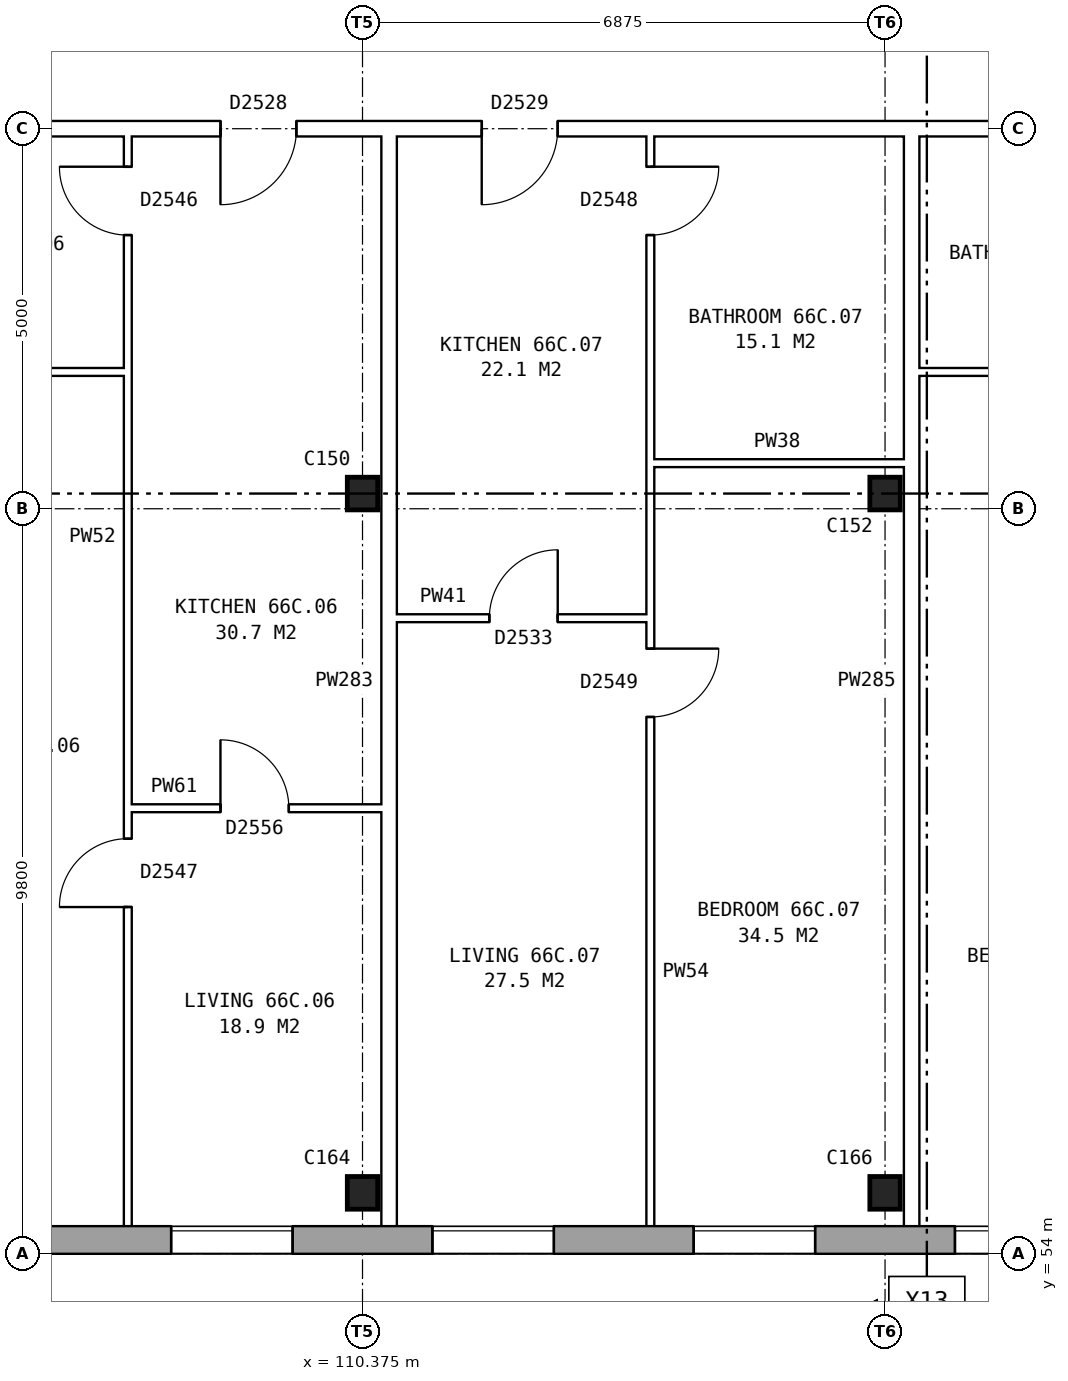
"""IFC4 building model, lengths in metres.
Left out: names, types, materials, properties, quantities, classifications, styles, units other than length and angle.
Written with IfcOpenShell. Run it as: python <this file> out.ifc"""

import sys

from ifc_helpers import new_model, si_unit, direction, frame, frame_2d, origin, origin_2d, place, context, subcontext, project, spatial, rectangle, i_section, extrude, element, fill, save


model = new_model("IFC4")
c1 = context("Model", 3, precision=1e-05, world=origin(), true_north=direction((0.0, 1.0)))
c2 = subcontext(c1, "Body", "Model", "MODEL_VIEW")
j1 = project(units=[si_unit("LENGTHUNIT", "METRE"), si_unit("PLANEANGLEUNIT", "RADIAN")], contexts=[c1])
p1 = place(None, origin())
s1 = spatial("IfcSite", under=j1, at=p1, CompositionType="ELEMENT")
p2 = place(p1, origin())
s2 = spatial("IfcBuilding", under=s1, at=p2, CompositionType="ELEMENT")
p3 = place(p2, frame((0.0, 0.0, 233.8)))
s3 = spatial("IfcBuildingStorey", under=s2, at=p3, CompositionType="ELEMENT", Elevation=233.8)
for number, where, z_axis, x_axis in (
    (1, (110.375, 54.8, 0.0), (0.0, 0.0, 1.0), (1.0, 0.0, 0.0)),
    (2, (117.25, 54.8, 0.0), (0.0, 0.0, 1.0), (1.0, 0.0, 0.0)),
    (3, (110.375, 64.0, 0.0), (0.0, 0.0, 1.0), (1.0, 0.0, 0.0)),
    (4, (117.25, 64.0, 0.0), (0.0, 0.0, 1.0), (1.0, 0.0, 0.0)),
):
    element("IfcColumn", number, at=place(p3, frame(where, z_axis=z_axis, x_axis=x_axis)), inside=s3, PredefinedType="COLUMN", context=c2, shape_type="SweptSolid", body=[
        extrude(i_section(OverallWidth=0.4, OverallDepth=0.43, WebThickness=0.028, FlangeThickness=0.04, at=origin_2d()), origin(), (0.0, 0.0, 1.0), 2.85),
    ])
p4 = place(p3, frame((75.95, 54.18, 0.0), z_axis=(0.0, 0.0, 1.0), x_axis=(1.0, 0.0, 0.0)))
e5 = element("IfcWall", 5, at=p4, inside=s3, PredefinedType="STANDARD", context=c2, shape_type="SweptSolid", body=[
    extrude(rectangle(XDim=55.1, YDim=0.36, at=frame_2d((27.55, 0.0))), origin(), (0.0, 0.0, 1.0), 2.85),
])
p5 = place(p4, frame((0.969, 0.0, 0.8)))
e6 = element("IfcOpeningElement", 6, at=p5, cuts=e5, PredefinedType="OPENING", context=c2, shape_type="SweptSolid", body=[
    extrude(rectangle(XDim=1.6, YDim=1.8, at=frame_2d((0.8, 0.9))), frame((0.0, 0.19, 0.0), z_axis=(0.0, -1.0, 0.0), x_axis=(1.0, 0.0, 0.0)), (0.0, 0.0, 1.0), 0.38),
])
p6 = place(p4, frame((4.406, 0.0, 0.8)))
e7 = element("IfcOpeningElement", 7, at=p6, cuts=e5, PredefinedType="OPENING", context=c2, shape_type="SweptSolid", body=[
    extrude(rectangle(XDim=1.6, YDim=1.8, at=frame_2d((0.8, 0.9))), frame((0.0, 0.19, 0.0), z_axis=(0.0, -1.0, 0.0), x_axis=(1.0, 0.0, 0.0)), (0.0, 0.0, 1.0), 0.38),
])
p7 = place(p4, frame((7.844, 0.0, 0.8)))
e8 = element("IfcOpeningElement", 8, at=p7, cuts=e5, PredefinedType="OPENING", context=c2, shape_type="SweptSolid", body=[
    extrude(rectangle(XDim=1.6, YDim=1.8, at=frame_2d((0.8, 0.9))), frame((0.0, 0.19, 0.0), z_axis=(0.0, -1.0, 0.0), x_axis=(1.0, 0.0, 0.0)), (0.0, 0.0, 1.0), 0.38),
])
p8 = place(p4, frame((11.281, 0.0, 0.8)))
e9 = element("IfcOpeningElement", 9, at=p8, cuts=e5, PredefinedType="OPENING", context=c2, shape_type="SweptSolid", body=[
    extrude(rectangle(XDim=1.6, YDim=1.8, at=frame_2d((0.8, 0.9))), frame((0.0, 0.19, 0.0), z_axis=(0.0, -1.0, 0.0), x_axis=(1.0, 0.0, 0.0)), (0.0, 0.0, 1.0), 0.38),
])
p9 = place(p4, frame((14.719, 0.0, 0.8)))
e10 = element("IfcOpeningElement", 10, at=p9, cuts=e5, PredefinedType="OPENING", context=c2, shape_type="SweptSolid", body=[
    extrude(rectangle(XDim=1.6, YDim=1.8, at=frame_2d((0.8, 0.9))), frame((0.0, 0.19, 0.0), z_axis=(0.0, -1.0, 0.0), x_axis=(1.0, 0.0, 0.0)), (0.0, 0.0, 1.0), 0.38),
])
p10 = place(p4, frame((18.156, 0.0, 0.8)))
e11 = element("IfcOpeningElement", 11, at=p10, cuts=e5, PredefinedType="OPENING", context=c2, shape_type="SweptSolid", body=[
    extrude(rectangle(XDim=1.6, YDim=1.8, at=frame_2d((0.8, 0.9))), frame((0.0, 0.19, 0.0), z_axis=(0.0, -1.0, 0.0), x_axis=(1.0, 0.0, 0.0)), (0.0, 0.0, 1.0), 0.38),
])
p11 = place(p4, frame((21.594, 0.0, 0.8)))
e12 = element("IfcOpeningElement", 12, at=p11, cuts=e5, PredefinedType="OPENING", context=c2, shape_type="SweptSolid", body=[
    extrude(rectangle(XDim=1.6, YDim=1.8, at=frame_2d((0.8, 0.9))), frame((0.0, 0.19, 0.0), z_axis=(0.0, -1.0, 0.0), x_axis=(1.0, 0.0, 0.0)), (0.0, 0.0, 1.0), 0.38),
])
p12 = place(p4, frame((25.031, 0.0, 0.8)))
e13 = element("IfcOpeningElement", 13, at=p12, cuts=e5, PredefinedType="OPENING", context=c2, shape_type="SweptSolid", body=[
    extrude(rectangle(XDim=1.6, YDim=1.8, at=frame_2d((0.8, 0.9))), frame((0.0, 0.19, 0.0), z_axis=(0.0, -1.0, 0.0), x_axis=(1.0, 0.0, 0.0)), (0.0, 0.0, 1.0), 0.38),
])
p13 = place(p4, frame((28.469, 0.0, 0.8)))
e14 = element("IfcOpeningElement", 14, at=p13, cuts=e5, PredefinedType="OPENING", context=c2, shape_type="SweptSolid", body=[
    extrude(rectangle(XDim=1.6, YDim=1.8, at=frame_2d((0.8, 0.9))), frame((0.0, 0.19, 0.0), z_axis=(0.0, -1.0, 0.0), x_axis=(1.0, 0.0, 0.0)), (0.0, 0.0, 1.0), 0.38),
])
p14 = place(p4, frame((31.906, 0.0, 0.8)))
e15 = element("IfcOpeningElement", 15, at=p14, cuts=e5, PredefinedType="OPENING", context=c2, shape_type="SweptSolid", body=[
    extrude(rectangle(XDim=1.6, YDim=1.8, at=frame_2d((0.8, 0.9))), frame((0.0, 0.19, 0.0), z_axis=(0.0, -1.0, 0.0), x_axis=(1.0, 0.0, 0.0)), (0.0, 0.0, 1.0), 0.38),
])
p15 = place(p4, frame((35.344, 0.0, 0.8)))
e16 = element("IfcOpeningElement", 16, at=p15, cuts=e5, PredefinedType="OPENING", context=c2, shape_type="SweptSolid", body=[
    extrude(rectangle(XDim=1.6, YDim=1.8, at=frame_2d((0.8, 0.9))), frame((0.0, 0.19, 0.0), z_axis=(0.0, -1.0, 0.0), x_axis=(1.0, 0.0, 0.0)), (0.0, 0.0, 1.0), 0.38),
])
p16 = place(p4, frame((38.781, 0.0, 0.8)))
e17 = element("IfcOpeningElement", 17, at=p16, cuts=e5, PredefinedType="OPENING", context=c2, shape_type="SweptSolid", body=[
    extrude(rectangle(XDim=1.6, YDim=1.8, at=frame_2d((0.8, 0.9))), frame((0.0, 0.19, 0.0), z_axis=(0.0, -1.0, 0.0), x_axis=(1.0, 0.0, 0.0)), (0.0, 0.0, 1.0), 0.38),
])
p17 = place(p4, frame((42.219, 0.0, 0.8)))
e18 = element("IfcOpeningElement", 18, at=p17, cuts=e5, PredefinedType="OPENING", context=c2, shape_type="SweptSolid", body=[
    extrude(rectangle(XDim=1.6, YDim=1.8, at=frame_2d((0.8, 0.9))), frame((0.0, 0.19, 0.0), z_axis=(0.0, -1.0, 0.0), x_axis=(1.0, 0.0, 0.0)), (0.0, 0.0, 1.0), 0.38),
])
p18 = place(p4, frame((45.656, 0.0, 0.8)))
e19 = element("IfcOpeningElement", 19, at=p18, cuts=e5, PredefinedType="OPENING", context=c2, shape_type="SweptSolid", body=[
    extrude(rectangle(XDim=1.6, YDim=1.8, at=frame_2d((0.8, 0.9))), frame((0.0, 0.19, 0.0), z_axis=(0.0, -1.0, 0.0), x_axis=(1.0, 0.0, 0.0)), (0.0, 0.0, 1.0), 0.38),
])
p19 = place(p4, frame((49.094, 0.0, 0.8)))
e20 = element("IfcOpeningElement", 20, at=p19, cuts=e5, PredefinedType="OPENING", context=c2, shape_type="SweptSolid", body=[
    extrude(rectangle(XDim=1.6, YDim=1.8, at=frame_2d((0.8, 0.9))), frame((0.0, 0.19, 0.0), z_axis=(0.0, -1.0, 0.0), x_axis=(1.0, 0.0, 0.0)), (0.0, 0.0, 1.0), 0.38),
])
p20 = place(p4, frame((52.531, 0.0, 0.8)))
e21 = element("IfcOpeningElement", 21, at=p20, cuts=e5, PredefinedType="OPENING", context=c2, shape_type="SweptSolid", body=[
    extrude(rectangle(XDim=1.6, YDim=1.8, at=frame_2d((0.8, 0.9))), frame((0.0, 0.19, 0.0), z_axis=(0.0, -1.0, 0.0), x_axis=(1.0, 0.0, 0.0)), (0.0, 0.0, 1.0), 0.38),
])
p21 = place(p3, frame((107.287, 59.86, 0.0), z_axis=(0.0, 0.0, 1.0), x_axis=(1.0, 0.0, 0.0)))
e22 = element("IfcWall", 22, at=p21, inside=s3, PredefinedType="PARTITIONING", context=c2, shape_type="SweptSolid", body=[
    extrude(rectangle(XDim=3.338, YDim=0.1, at=frame_2d((1.669, 0.0))), origin(), (0.0, 0.0, 1.0), 2.85),
])
p22 = place(p21, frame((1.219, 0.0, 0.0)))
e23 = element("IfcOpeningElement", 23, at=p22, cuts=e22, PredefinedType="OPENING", context=c2, shape_type="SweptSolid", body=[
    extrude(rectangle(XDim=0.9, YDim=2.1, at=frame_2d((0.45, 1.05))), frame((0.0, 0.06, 0.0), z_axis=(0.0, -1.0, 0.0), x_axis=(1.0, 0.0, 0.0)), (0.0, 0.0, 1.0), 0.12),
])
p23 = place(p3, frame((110.825, 62.36, 0.0), z_axis=(0.0, 0.0, 1.0), x_axis=(1.0, 0.0, 0.0)))
e24 = element("IfcWall", 24, at=p23, inside=s3, PredefinedType="PARTITIONING", context=c2, shape_type="SweptSolid", body=[
    extrude(rectangle(XDim=3.337, YDim=0.1, at=frame_2d((1.668, 0.0))), origin(), (0.0, 0.0, 1.0), 2.85),
])
p24 = place(p23, frame((1.219, 0.0, 0.0)))
e25 = element("IfcOpeningElement", 25, at=p24, cuts=e24, PredefinedType="OPENING", context=c2, shape_type="SweptSolid", body=[
    extrude(rectangle(XDim=0.9, YDim=2.1, at=frame_2d((0.45, 1.05))), frame((0.0, 0.06, 0.0), z_axis=(0.0, -1.0, 0.0), x_axis=(1.0, 0.0, 0.0)), (0.0, 0.0, 1.0), 0.12),
])
p25 = place(p3, frame((114.162, 64.4, 0.0), z_axis=(0.0, 0.0, 1.0), x_axis=(1.0, 0.0, 0.0)))
e26 = element("IfcWall", 26, at=p25, inside=s3, PredefinedType="PARTITIONING", context=c2, shape_type="SweptSolid", body=[
    extrude(rectangle(XDim=3.338, YDim=0.1, at=frame_2d((1.669, 0.0))), origin(), (0.0, 0.0, 1.0), 2.85),
])
for number, where, z_axis, x_axis in (
    (27, (103.95, 65.6, 0.0), (0.0, 0.0, 1.0), (1.0, 0.0, 0.0)),
    (28, (117.7, 65.6, 0.0), (0.0, 0.0, 1.0), (1.0, 0.0, 0.0)),
):
    element("IfcWall", number, at=place(p3, frame(where, z_axis=z_axis, x_axis=x_axis)), inside=s3, PredefinedType="PARTITIONING", context=c2, shape_type="SweptSolid", body=[
        extrude(rectangle(XDim=3.337, YDim=0.1, at=frame_2d((1.668, 0.0))), origin(), (0.0, 0.0, 1.0), 2.85),
    ])
p26 = place(p3, frame((75.64, 68.8, 0.0), z_axis=(0.0, 0.0, 1.0), x_axis=(1.0, 0.0, 0.0)))
e29 = element("IfcWall", 29, at=p26, inside=s3, PredefinedType="PARTITIONING", context=c2, shape_type="SweptSolid", body=[
    extrude(rectangle(XDim=55.72, YDim=0.2, at=frame_2d((27.86, 0.0))), origin(), (0.0, 0.0, 1.0), 2.85),
])
p27 = place(p26, frame((5.191, 0.0, 0.0)))
e30 = element("IfcOpeningElement", 30, at=p27, cuts=e29, PredefinedType="OPENING", context=c2, shape_type="SweptSolid", body=[
    extrude(rectangle(XDim=1.0, YDim=2.1, at=frame_2d((0.5, 1.05))), frame((0.0, 0.11, 0.0), z_axis=(0.0, -1.0, 0.0), x_axis=(1.0, 0.0, 0.0)), (0.0, 0.0, 1.0), 0.22),
])
p28 = place(p26, frame((12.241, 0.0, 0.0)))
e31 = element("IfcOpeningElement", 31, at=p28, cuts=e29, PredefinedType="OPENING", context=c2, shape_type="SweptSolid", body=[
    extrude(rectangle(XDim=1.0, YDim=2.1, at=frame_2d((0.5, 1.05))), frame((0.0, 0.11, 0.0), z_axis=(0.0, -1.0, 0.0), x_axis=(1.0, 0.0, 0.0)), (0.0, 0.0, 1.0), 0.22),
])
p29 = place(p26, frame((22.553, 0.0, 0.0)))
e32 = element("IfcOpeningElement", 32, at=p29, cuts=e29, PredefinedType="OPENING", context=c2, shape_type="SweptSolid", body=[
    extrude(rectangle(XDim=1.0, YDim=2.1, at=frame_2d((0.5, 1.05))), frame((0.0, 0.11, 0.0), z_axis=(0.0, -1.0, 0.0), x_axis=(1.0, 0.0, 0.0)), (0.0, 0.0, 1.0), 0.22),
])
p30 = place(p26, frame((32.866, 0.0, 0.0)))
e33 = element("IfcOpeningElement", 33, at=p30, cuts=e29, PredefinedType="OPENING", context=c2, shape_type="SweptSolid", body=[
    extrude(rectangle(XDim=1.0, YDim=2.1, at=frame_2d((0.5, 1.05))), frame((0.0, 0.11, 0.0), z_axis=(0.0, -1.0, 0.0), x_axis=(1.0, 0.0, 0.0)), (0.0, 0.0, 1.0), 0.22),
])
p31 = place(p26, frame((36.303, 0.0, 0.0)))
e34 = element("IfcOpeningElement", 34, at=p31, cuts=e29, PredefinedType="OPENING", context=c2, shape_type="SweptSolid", body=[
    extrude(rectangle(XDim=1.0, YDim=2.1, at=frame_2d((0.5, 1.05))), frame((0.0, 0.11, 0.0), z_axis=(0.0, -1.0, 0.0), x_axis=(1.0, 0.0, 0.0)), (0.0, 0.0, 1.0), 0.22),
])
p32 = place(p26, frame((46.616, 0.0, 0.0)))
e35 = element("IfcOpeningElement", 35, at=p32, cuts=e29, PredefinedType="OPENING", context=c2, shape_type="SweptSolid", body=[
    extrude(rectangle(XDim=1.0, YDim=2.1, at=frame_2d((0.5, 1.05))), frame((0.0, 0.11, 0.0), z_axis=(0.0, -1.0, 0.0), x_axis=(1.0, 0.0, 0.0)), (0.0, 0.0, 1.0), 0.22),
])
p33 = place(p26, frame((53.496, 0.0, 0.0)))
e36 = element("IfcOpeningElement", 36, at=p33, cuts=e29, PredefinedType="OPENING", context=c2, shape_type="SweptSolid", body=[
    extrude(rectangle(XDim=1.0, YDim=2.1, at=frame_2d((0.5, 1.05))), frame((0.0, 0.11, 0.0), z_axis=(0.0, -1.0, 0.0), x_axis=(1.0, 0.0, 0.0)), (0.0, 0.0, 1.0), 0.22),
])
p34 = place(p3, frame((107.287, 54.36, 0.0), z_axis=(0.0, 0.0, 1.0), x_axis=(0.0, 1.0, 0.0)))
e37 = element("IfcWall", 37, at=p34, inside=s3, PredefinedType="PARTITIONING", context=c2, shape_type="SweptSolid", body=[
    extrude(rectangle(XDim=14.34, YDim=0.1, at=frame_2d((7.17, 0.0))), origin(), (0.0, 0.0, 1.0), 2.85),
])
p35 = place(p34, frame((4.2, 0.0, 0.0)))
e38 = element("IfcOpeningElement", 38, at=p35, cuts=e37, PredefinedType="OPENING", context=c2, shape_type="SweptSolid", body=[
    extrude(rectangle(XDim=0.9, YDim=2.1, at=frame_2d((0.45, 1.05))), frame((0.0, 0.06, 0.0), z_axis=(0.0, -1.0, 0.0), x_axis=(1.0, 0.0, 0.0)), (0.0, 0.0, 1.0), 0.12),
])
p36 = place(p34, frame((13.04, 0.0, 0.0)))
e39 = element("IfcOpeningElement", 39, at=p36, cuts=e37, PredefinedType="OPENING", context=c2, shape_type="SweptSolid", body=[
    extrude(rectangle(XDim=0.9, YDim=2.1, at=frame_2d((0.45, 1.05))), frame((0.0, 0.06, 0.0), z_axis=(0.0, -1.0, 0.0), x_axis=(1.0, 0.0, 0.0)), (0.0, 0.0, 1.0), 0.12),
])
p37 = place(p3, frame((110.725, 54.36, 0.0), z_axis=(0.0, 0.0, 1.0), x_axis=(0.0, 1.0, 0.0)))
e40 = element("IfcWall", 40, at=p37, inside=s3, PredefinedType="PARTITIONING", context=c2, shape_type="SweptSolid", body=[
    extrude(rectangle(XDim=14.34, YDim=0.2, at=frame_2d((7.17, 0.0))), origin(), (0.0, 0.0, 1.0), 2.85),
])
p38 = place(p3, frame((114.162, 54.36, 0.0), z_axis=(0.0, 0.0, 1.0), x_axis=(0.0, 1.0, 0.0)))
e41 = element("IfcWall", 41, at=p38, inside=s3, PredefinedType="PARTITIONING", context=c2, shape_type="SweptSolid", body=[
    extrude(rectangle(XDim=14.34, YDim=0.1, at=frame_2d((7.17, 0.0))), origin(), (0.0, 0.0, 1.0), 2.85),
])
p39 = place(p38, frame((6.7, 0.0, 0.0)))
e42 = element("IfcOpeningElement", 42, at=p39, cuts=e41, PredefinedType="OPENING", context=c2, shape_type="SweptSolid", body=[
    extrude(rectangle(XDim=0.9, YDim=2.1, at=frame_2d((0.45, 1.05))), frame((0.0, 0.06, 0.0), z_axis=(0.0, -1.0, 0.0), x_axis=(1.0, 0.0, 0.0)), (0.0, 0.0, 1.0), 0.12),
])
p40 = place(p38, frame((13.04, 0.0, 0.0)))
e43 = element("IfcOpeningElement", 43, at=p40, cuts=e41, PredefinedType="OPENING", context=c2, shape_type="SweptSolid", body=[
    extrude(rectangle(XDim=0.9, YDim=2.1, at=frame_2d((0.45, 1.05))), frame((0.0, 0.06, 0.0), z_axis=(0.0, -1.0, 0.0), x_axis=(1.0, 0.0, 0.0)), (0.0, 0.0, 1.0), 0.12),
])
p41 = place(p3, frame((117.6, 54.36, 0.0), z_axis=(0.0, 0.0, 1.0), x_axis=(0.0, 1.0, 0.0)))
e44 = element("IfcWall", 44, at=p41, inside=s3, PredefinedType="PARTITIONING", context=c2, shape_type="SweptSolid", body=[
    extrude(rectangle(XDim=14.34, YDim=0.2, at=frame_2d((7.17, 0.0))), origin(), (0.0, 0.0, 1.0), 2.85),
])
p42 = place(p14, origin())
e45 = element("IfcWindow", 45, at=p42, inside=s3, PartitioningType="SINGLE_PANEL", PredefinedType="WINDOW", context=c2, shape_type="SweptSolid", body=[
    extrude(rectangle(XDim=1.6, YDim=1.8, at=frame_2d((0.8, 0.9))), frame((0.0, 0.15, 0.0), z_axis=(0.0, -1.0, 0.0), x_axis=(1.0, 0.0, 0.0)), (0.0, 0.0, 1.0), 0.06),
])
fill(e15, e45)
p43 = place(p15, origin())
e46 = element("IfcWindow", 46, at=p43, inside=s3, PartitioningType="SINGLE_PANEL", PredefinedType="WINDOW", context=c2, shape_type="SweptSolid", body=[
    extrude(rectangle(XDim=1.6, YDim=1.8, at=frame_2d((0.8, 0.9))), frame((0.0, 0.15, 0.0), z_axis=(0.0, -1.0, 0.0), x_axis=(1.0, 0.0, 0.0)), (0.0, 0.0, 1.0), 0.06),
])
fill(e16, e46)
p44 = place(p16, origin())
e47 = element("IfcWindow", 47, at=p44, inside=s3, PartitioningType="SINGLE_PANEL", PredefinedType="WINDOW", context=c2, shape_type="SweptSolid", body=[
    extrude(rectangle(XDim=1.6, YDim=1.8, at=frame_2d((0.8, 0.9))), frame((0.0, 0.15, 0.0), z_axis=(0.0, -1.0, 0.0), x_axis=(1.0, 0.0, 0.0)), (0.0, 0.0, 1.0), 0.06),
])
fill(e17, e47)
p45 = place(p17, origin())
e48 = element("IfcWindow", 48, at=p45, inside=s3, PartitioningType="SINGLE_PANEL", PredefinedType="WINDOW", context=c2, shape_type="SweptSolid", body=[
    extrude(rectangle(XDim=1.6, YDim=1.8, at=frame_2d((0.8, 0.9))), frame((0.0, 0.15, 0.0), z_axis=(0.0, -1.0, 0.0), x_axis=(1.0, 0.0, 0.0)), (0.0, 0.0, 1.0), 0.06),
])
fill(e18, e48)
p46 = place(p35, origin())
e49 = element("IfcDoor", 49, at=p46, inside=s3, OperationType="SINGLE_SWING_LEFT", PredefinedType="DOOR", context=c2, shape_type="SweptSolid", body=[
    extrude(rectangle(XDim=0.9, YDim=2.1, at=frame_2d((0.45, 1.05))), frame((0.0, 0.025, 0.0), z_axis=(0.0, -1.0, 0.0), x_axis=(1.0, 0.0, 0.0)), (0.0, 0.0, 1.0), 0.05),
])
fill(e38, e49)
p47 = place(p30, frame((1.0, 0.0, 0.0), z_axis=(0.0, 0.0, 1.0), x_axis=(-1.0, 0.0, 0.0)))
e50 = element("IfcDoor", 50, at=p47, inside=s3, OperationType="SINGLE_SWING_RIGHT", PredefinedType="DOOR", context=c2, shape_type="SweptSolid", body=[
    extrude(rectangle(XDim=1.0, YDim=2.1, at=frame_2d((0.5, 1.05))), frame((0.0, 0.025, 0.0), z_axis=(0.0, -1.0, 0.0), x_axis=(1.0, 0.0, 0.0)), (0.0, 0.0, 1.0), 0.05),
])
fill(e33, e50)
p48 = place(p22, origin())
e51 = element("IfcDoor", 51, at=p48, inside=s3, OperationType="SINGLE_SWING_LEFT", PredefinedType="DOOR", context=c2, shape_type="SweptSolid", body=[
    extrude(rectangle(XDim=0.9, YDim=2.1, at=frame_2d((0.45, 1.05))), frame((0.0, 0.025, 0.0), z_axis=(0.0, -1.0, 0.0), x_axis=(1.0, 0.0, 0.0)), (0.0, 0.0, 1.0), 0.05),
])
fill(e23, e51)
p49 = place(p36, origin())
e52 = element("IfcDoor", 52, at=p49, inside=s3, OperationType="SINGLE_SWING_RIGHT", PredefinedType="DOOR", context=c2, shape_type="SweptSolid", body=[
    extrude(rectangle(XDim=0.9, YDim=2.1, at=frame_2d((0.45, 1.05))), frame((0.0, 0.025, 0.0), z_axis=(0.0, -1.0, 0.0), x_axis=(1.0, 0.0, 0.0)), (0.0, 0.0, 1.0), 0.05),
])
fill(e39, e52)
p50 = place(p39, frame((0.9, 0.0, 0.0), z_axis=(0.0, 0.0, 1.0), x_axis=(-1.0, 0.0, 0.0)))
e53 = element("IfcDoor", 53, at=p50, inside=s3, OperationType="SINGLE_SWING_LEFT", PredefinedType="DOOR", context=c2, shape_type="SweptSolid", body=[
    extrude(rectangle(XDim=0.9, YDim=2.1, at=frame_2d((0.45, 1.05))), frame((0.0, 0.025, 0.0), z_axis=(0.0, -1.0, 0.0), x_axis=(1.0, 0.0, 0.0)), (0.0, 0.0, 1.0), 0.05),
])
fill(e42, e53)
p51 = place(p31, frame((1.0, 0.0, 0.0), z_axis=(0.0, 0.0, 1.0), x_axis=(-1.0, 0.0, 0.0)))
e54 = element("IfcDoor", 54, at=p51, inside=s3, OperationType="SINGLE_SWING_RIGHT", PredefinedType="DOOR", context=c2, shape_type="SweptSolid", body=[
    extrude(rectangle(XDim=1.0, YDim=2.1, at=frame_2d((0.5, 1.05))), frame((0.0, 0.025, 0.0), z_axis=(0.0, -1.0, 0.0), x_axis=(1.0, 0.0, 0.0)), (0.0, 0.0, 1.0), 0.05),
])
fill(e34, e54)
p52 = place(p24, origin())
e55 = element("IfcDoor", 55, at=p52, inside=s3, OperationType="SINGLE_SWING_RIGHT", PredefinedType="DOOR", context=c2, shape_type="SweptSolid", body=[
    extrude(rectangle(XDim=0.9, YDim=2.1, at=frame_2d((0.45, 1.05))), frame((0.0, 0.025, 0.0), z_axis=(0.0, -1.0, 0.0), x_axis=(1.0, 0.0, 0.0)), (0.0, 0.0, 1.0), 0.05),
])
fill(e25, e55)
p53 = place(p40, frame((0.9, 0.0, 0.0), z_axis=(0.0, 0.0, 1.0), x_axis=(-1.0, 0.0, 0.0)))
e56 = element("IfcDoor", 56, at=p53, inside=s3, OperationType="SINGLE_SWING_LEFT", PredefinedType="DOOR", context=c2, shape_type="SweptSolid", body=[
    extrude(rectangle(XDim=0.9, YDim=2.1, at=frame_2d((0.45, 1.05))), frame((0.0, 0.025, 0.0), z_axis=(0.0, -1.0, 0.0), x_axis=(1.0, 0.0, 0.0)), (0.0, 0.0, 1.0), 0.05),
])
fill(e43, e56)
save(model, sys.argv[1])
